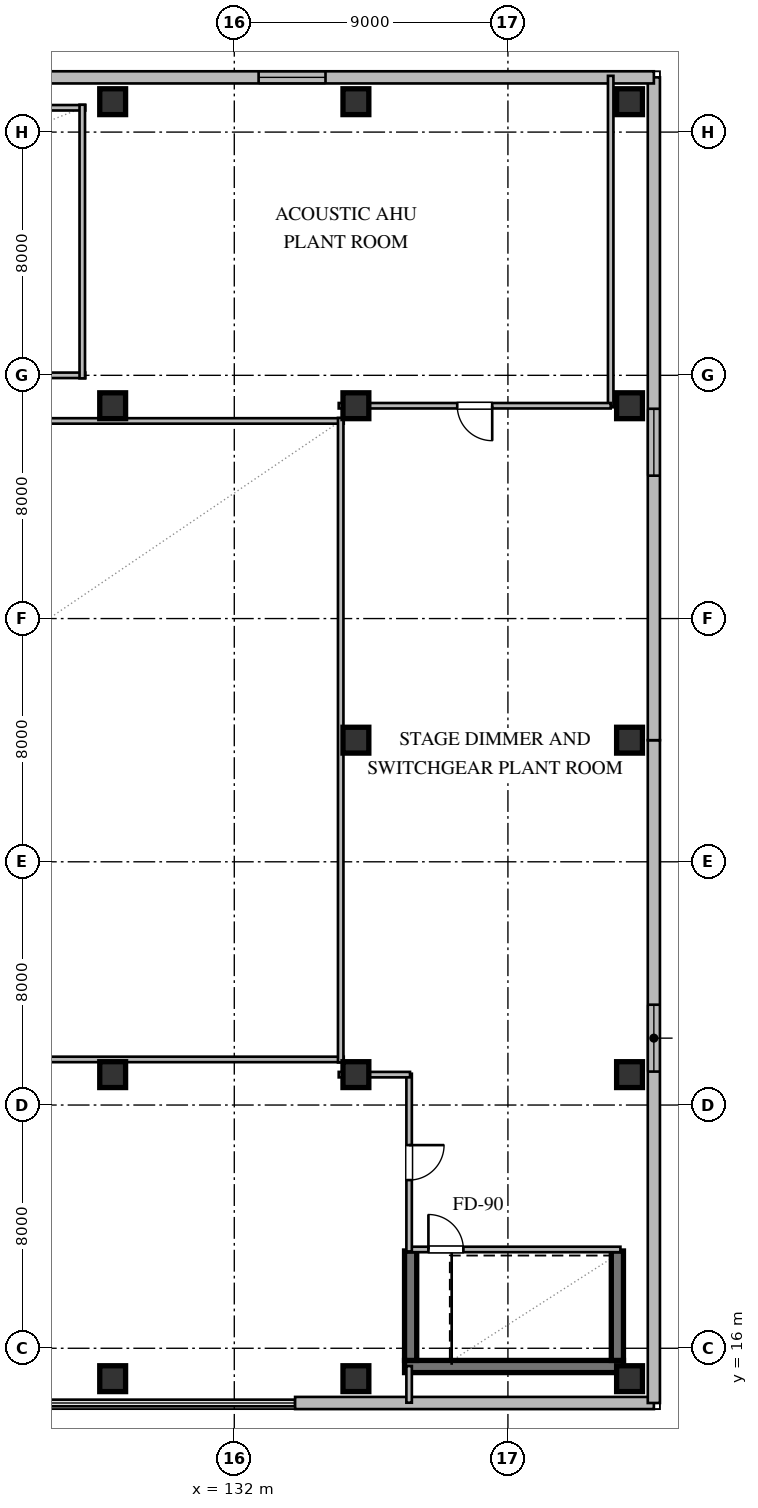
"""IFC4 building model, lengths in metres.
Left out: names, types, materials, properties, quantities, classifications, styles, units other than length and angle.
Written with IfcOpenShell. Run it as: python <this file> out.ifc"""

import sys

from ifc_helpers import new_model, si_unit, direction, frame, frame_2d, origin, origin_2d, place, context, subcontext, project, spatial, rectangle, extrude, element, fill, save


model = new_model("IFC4")
c1 = context("Model", 3, precision=1e-05, world=origin(), true_north=direction((0.0, 1.0)))
c2 = subcontext(c1, "Body", "Model", "MODEL_VIEW")
j1 = project(units=[si_unit("LENGTHUNIT", "METRE"), si_unit("PLANEANGLEUNIT", "RADIAN")], contexts=[c1])
p1 = place(None, origin())
s1 = spatial("IfcSite", under=j1, at=p1, CompositionType="ELEMENT")
p2 = place(p1, origin())
s2 = spatial("IfcBuilding", under=s1, at=p2, CompositionType="ELEMENT")
p3 = place(p2, frame((0.0, 0.0, 14.4)))
s3 = spatial("IfcBuildingStorey", under=s2, at=p3, CompositionType="ELEMENT", Elevation=14.4)
for number, where, z_axis, x_axis in (
    (1, (128.0, 15.0, 0.0), (0.0, 0.0, 1.0), (1.0, 0.0, 0.0)),
    (2, (128.0, 25.0, 0.0), (0.0, 0.0, 1.0), (1.0, 0.0, 0.0)),
    (3, (128.0, 47.0, 0.0), (0.0, 0.0, 1.0), (1.0, 0.0, 0.0)),
    (4, (128.0, 57.0, 0.0), (0.0, 0.0, 1.0), (1.0, 0.0, 0.0)),
    (5, (136.0, 15.0, 0.0), (0.0, 0.0, 1.0), (1.0, 0.0, 0.0)),
    (6, (136.0, 25.0, 0.0), (0.0, 0.0, 1.0), (1.0, 0.0, 0.0)),
    (7, (136.0, 36.0, 0.0), (0.0, 0.0, 1.0), (1.0, 0.0, 0.0)),
    (8, (136.0, 47.0, 0.0), (0.0, 0.0, 1.0), (1.0, 0.0, 0.0)),
    (9, (136.0, 57.0, 0.0), (0.0, 0.0, 1.0), (1.0, 0.0, 0.0)),
    (10, (145.0, 15.0, 0.0), (0.0, 0.0, 1.0), (1.0, 0.0, 0.0)),
    (11, (145.0, 25.0, 0.0), (0.0, 0.0, 1.0), (1.0, 0.0, 0.0)),
    (12, (145.0, 36.0, 0.0), (0.0, 0.0, 1.0), (1.0, 0.0, 0.0)),
    (13, (145.0, 47.0, 0.0), (0.0, 0.0, 1.0), (1.0, 0.0, 0.0)),
    (14, (145.0, 57.0, 0.0), (0.0, 0.0, 1.0), (1.0, 0.0, 0.0)),
):
    element("IfcColumn", number, at=place(p3, frame(where, z_axis=z_axis, x_axis=x_axis)), inside=s3, PredefinedType="COLUMN", context=c2, shape_type="SweptSolid", body=[
        extrude(rectangle(XDim=0.85, YDim=0.85, at=origin_2d()), origin(), (0.0, 0.0, 1.0), 4.8),
    ])
p4 = place(p3, frame((137.6, 15.4, 0.0), z_axis=(0.0, 0.0, 1.0), x_axis=(1.0, 0.0, 0.0)))
e15 = element("IfcWall", 15, at=p4, inside=s3, PredefinedType="SHEAR", context=c2, shape_type="SweptSolid", body=[
    extrude(rectangle(XDim=7.2, YDim=0.4, at=frame_2d((3.6, 0.0))), origin(), (0.0, 0.0, 1.0), 4.52),
])
for number, where, z_axis, x_axis in (
    (16, (137.8, 15.6, 0.0), (0.0, 0.0, 1.0), (0.0, 1.0, 0.0)),
    (17, (144.6, 15.6, 0.0), (0.0, 0.0, 1.0), (0.0, 1.0, 0.0)),
):
    element("IfcWall", number, at=place(p3, frame(where, z_axis=z_axis, x_axis=x_axis)), inside=s3, PredefinedType="SHEAR", context=c2, shape_type="SweptSolid", body=[
        extrude(rectangle(XDim=3.6, YDim=0.4, at=frame_2d((1.8, 0.0))), origin(), (0.0, 0.0, 1.0), 4.52),
    ])
p5 = place(p3, frame((134.0, 14.2, 0.0), z_axis=(0.0, 0.0, 1.0), x_axis=(1.0, 0.0, 0.0)))
e18 = element("IfcWall", 18, at=p5, inside=s3, PredefinedType="STANDARD", context=c2, shape_type="SweptSolid", body=[
    extrude(rectangle(XDim=11.8, YDim=0.4, at=frame_2d((5.9, 0.0))), origin(), (0.0, 0.0, 1.0), 4.52),
])
p6 = place(p3, frame((145.8, 14.2, 0.0), z_axis=(0.0, 0.0, 1.0), x_axis=(0.0, 1.0, 0.0)))
e19 = element("IfcWall", 19, at=p6, inside=s3, PredefinedType="STANDARD", context=c2, shape_type="SweptSolid", body=[
    extrude(rectangle(XDim=21.8, YDim=0.4, at=frame_2d((10.9, 0.0))), origin(), (0.0, 0.0, 1.0), 4.52),
])
p7 = place(p6, frame((10.9, 0.0, 1.25)))
e20 = element("IfcOpeningElement", 20, at=p7, cuts=e19, PredefinedType="OPENING", context=c2, shape_type="SweptSolid", body=[
    extrude(rectangle(XDim=2.2, YDim=1.5, at=frame_2d((1.1, 0.75))), frame((0.0, 0.21, 0.0), z_axis=(0.0, -1.0, 0.0), x_axis=(1.0, 0.0, 0.0)), (0.0, 0.0, 1.0), 0.42),
])
p8 = place(p3, frame((145.8, 36.0, 0.0), z_axis=(0.0, 0.0, 1.0), x_axis=(0.0, 1.0, 0.0)))
e21 = element("IfcWall", 21, at=p8, inside=s3, PredefinedType="STANDARD", context=c2, shape_type="SweptSolid", body=[
    extrude(rectangle(XDim=21.8, YDim=0.4, at=frame_2d((10.9, 0.0))), origin(), (0.0, 0.0, 1.0), 4.52),
])
p9 = place(p8, frame((8.7, 0.0, 1.25)))
e22 = element("IfcOpeningElement", 22, at=p9, cuts=e21, PredefinedType="OPENING", context=c2, shape_type="SweptSolid", body=[
    extrude(rectangle(XDim=2.2, YDim=1.5, at=frame_2d((1.1, 0.75))), frame((0.0, 0.21, 0.0), z_axis=(0.0, -1.0, 0.0), x_axis=(1.0, 0.0, 0.0)), (0.0, 0.0, 1.0), 0.42),
])
p10 = place(p3, frame((145.8, 57.8, 0.0), z_axis=(0.0, 0.0, 1.0), x_axis=(-1.0, 0.0, 0.0)))
e23 = element("IfcWall", 23, at=p10, inside=s3, PredefinedType="STANDARD", context=c2, shape_type="SweptSolid", body=[
    extrude(rectangle(XDim=23.8, YDim=0.4, at=frame_2d((11.9, 0.0))), origin(), (0.0, 0.0, 1.0), 4.52),
])
p11 = place(p10, frame((10.8, 0.0, 1.25)))
e24 = element("IfcOpeningElement", 24, at=p11, cuts=e23, PredefinedType="OPENING", context=c2, shape_type="SweptSolid", body=[
    extrude(rectangle(XDim=2.2, YDim=1.5, at=frame_2d((1.1, 0.75))), frame((0.0, 0.21, 0.0), z_axis=(0.0, -1.0, 0.0), x_axis=(1.0, 0.0, 0.0)), (0.0, 0.0, 1.0), 0.42),
])
p12 = place(p3, frame((137.7, 19.25, 0.0), z_axis=(0.0, 0.0, 1.0), x_axis=(1.0, 0.0, 0.0)))
e25 = element("IfcWall", 25, at=p12, inside=s3, PredefinedType="PARTITIONING", context=c2, shape_type="SweptSolid", body=[
    extrude(rectangle(XDim=7.0, YDim=0.18, at=frame_2d((3.5, 0.0))), origin(), (0.0, 0.0, 1.0), 4.52),
])
p13 = place(p12, frame((0.685, 0.0, 0.0)))
e26 = element("IfcOpeningElement", 26, at=p13, cuts=e25, PredefinedType="OPENING", context=c2, shape_type="SweptSolid", body=[
    extrude(rectangle(XDim=1.15, YDim=2.1, at=frame_2d((0.575, 1.05))), frame((0.0, 0.1, 0.0), z_axis=(0.0, -1.0, 0.0), x_axis=(1.0, 0.0, 0.0)), (0.0, 0.0, 1.0), 0.2),
])
for number, where, z_axis, x_axis in (
    (27, (104.4, 25.5, 0.0), (0.0, 0.0, 1.0), (1.0, 0.0, 0.0)),
    (28, (104.4, 46.5, 0.0), (0.0, 0.0, 1.0), (1.0, 0.0, 0.0)),
):
    element("IfcWall", number, at=place(p3, frame(where, z_axis=z_axis, x_axis=x_axis)), inside=s3, PredefinedType="PARTITIONING", context=c2, shape_type="SweptSolid", body=[
        extrude(rectangle(XDim=31.2, YDim=0.18, at=frame_2d((15.6, 0.0))), origin(), (0.0, 0.0, 1.0), 3.899),
    ])
p14 = place(p3, frame((135.5, 25.4, 0.0), z_axis=(0.0, 0.0, 1.0), x_axis=(0.0, 1.0, 0.0)))
e29 = element("IfcWall", 29, at=p14, inside=s3, PredefinedType="PARTITIONING", context=c2, shape_type="SweptSolid", body=[
    extrude(rectangle(XDim=21.2, YDim=0.18, at=frame_2d((10.6, 0.0))), origin(), (0.0, 0.0, 1.0), 4.093),
])
p15 = place(p3, frame((104.9, 48.0, 0.0), z_axis=(0.0, 0.0, 1.0), x_axis=(1.0, 0.0, 0.0)))
e30 = element("IfcWall", 30, at=p15, inside=s3, PredefinedType="PARTITIONING", context=c2, shape_type="SweptSolid", body=[
    extrude(rectangle(XDim=22.2, YDim=0.18, at=frame_2d((11.1, 0.0))), origin(), (0.0, 0.0, 1.0), 4.52),
])
p16 = place(p3, frame((104.9, 56.8, 0.0), z_axis=(0.0, 0.0, 1.0), x_axis=(1.0, 0.0, 0.0)))
e31 = element("IfcWall", 31, at=p16, inside=s3, PredefinedType="PARTITIONING", context=c2, shape_type="SweptSolid", body=[
    extrude(rectangle(XDim=22.2, YDim=0.18, at=frame_2d((11.1, 0.0))), origin(), (0.0, 0.0, 1.0), 3.899),
])
p17 = place(p3, frame((127.0, 47.9, 0.0), z_axis=(0.0, 0.0, 1.0), x_axis=(0.0, 1.0, 0.0)))
e32 = element("IfcWall", 32, at=p17, inside=s3, PredefinedType="PARTITIONING", context=c2, shape_type="SweptSolid", body=[
    extrude(rectangle(XDim=9.0, YDim=0.18, at=frame_2d((4.5, 0.0))), origin(), (0.0, 0.0, 1.0), 4.52),
])
p18 = place(p3, frame((144.38, 46.95, 0.0), z_axis=(0.0, 0.0, 1.0), x_axis=(0.0, 1.0, 0.0)))
e33 = element("IfcWall", 33, at=p18, inside=s3, PredefinedType="PARTITIONING", context=c2, shape_type="SweptSolid", body=[
    extrude(rectangle(XDim=10.9, YDim=0.18, at=frame_2d((5.45, 0.0))), origin(), (0.0, 0.0, 1.0), 4.093),
])
p19 = place(p3, frame((137.75, 25.03, 0.0), z_axis=(0.0, 0.0, 1.0), x_axis=(0.0, -1.0, 0.0)))
e34 = element("IfcWall", 34, at=p19, inside=s3, PredefinedType="PARTITIONING", context=c2, shape_type="SweptSolid", body=[
    extrude(rectangle(XDim=5.845, YDim=0.18, at=frame_2d((2.922, 0.0))), origin(), (0.0, 0.0, 1.0), 4.52),
])
p20 = place(p19, frame((2.348, 0.0, 0.0)))
e35 = element("IfcOpeningElement", 35, at=p20, cuts=e34, PredefinedType="OPENING", context=c2, shape_type="SweptSolid", body=[
    extrude(rectangle(XDim=1.15, YDim=2.1, at=frame_2d((0.575, 1.05))), frame((0.0, 0.1, 0.0), z_axis=(0.0, -1.0, 0.0), x_axis=(1.0, 0.0, 0.0)), (0.0, 0.0, 1.0), 0.2),
])
p21 = place(p3, frame((135.435, 25.0, 0.0), z_axis=(0.0, 0.0, 1.0), x_axis=(1.0, 0.0, 0.0)))
e36 = element("IfcWall", 36, at=p21, inside=s3, PredefinedType="PARTITIONING", context=c2, shape_type="SweptSolid", body=[
    extrude(rectangle(XDim=2.345, YDim=0.18, at=frame_2d((1.172, 0.0))), origin(), (0.0, 0.0, 1.0), 3.899),
])
p22 = place(p3, frame((137.75, 15.415, 0.0), z_axis=(0.0, 0.0, 1.0), x_axis=(0.0, -1.0, 0.0)))
e37 = element("IfcWall", 37, at=p22, inside=s3, PredefinedType="PARTITIONING", context=c2, shape_type="SweptSolid", body=[
    extrude(rectangle(XDim=1.205, YDim=0.18, at=frame_2d((0.603, 0.0))), origin(), (0.0, 0.0, 1.0), 4.52),
])
p23 = place(p3, frame((144.38, 47.0, 0.0), z_axis=(0.0, 0.0, 1.0), x_axis=(-1.0, 0.0, 0.0)))
e38 = element("IfcWall", 38, at=p23, inside=s3, PredefinedType="PARTITIONING", context=c2, shape_type="SweptSolid", body=[
    extrude(rectangle(XDim=8.945, YDim=0.18, at=frame_2d((4.472, 0.0))), origin(), (0.0, 0.0, 1.0), 3.899),
])
p24 = place(p23, frame((3.897, 0.0, 0.0)))
e39 = element("IfcOpeningElement", 39, at=p24, cuts=e38, PredefinedType="OPENING", context=c2, shape_type="SweptSolid", body=[
    extrude(rectangle(XDim=1.15, YDim=2.1, at=frame_2d((0.575, 1.05))), frame((0.0, 0.1, 0.0), z_axis=(0.0, -1.0, 0.0), x_axis=(1.0, 0.0, 0.0)), (0.0, 0.0, 1.0), 0.2),
])
p25 = place(p7, origin())
e40 = element("IfcWindow", 40, at=p25, inside=s3, PartitioningType="SINGLE_PANEL", PredefinedType="WINDOW", context=c2, shape_type="SweptSolid", body=[
    extrude(rectangle(XDim=2.2, YDim=1.5, at=frame_2d((1.1, 0.75))), frame((0.0, 0.03, 0.0), z_axis=(0.0, -1.0, 0.0), x_axis=(1.0, 0.0, 0.0)), (0.0, 0.0, 1.0), 0.06),
])
fill(e20, e40)
p26 = place(p9, origin())
e41 = element("IfcWindow", 41, at=p26, inside=s3, PartitioningType="SINGLE_PANEL", PredefinedType="WINDOW", context=c2, shape_type="SweptSolid", body=[
    extrude(rectangle(XDim=2.2, YDim=1.5, at=frame_2d((1.1, 0.75))), frame((0.0, 0.03, 0.0), z_axis=(0.0, -1.0, 0.0), x_axis=(1.0, 0.0, 0.0)), (0.0, 0.0, 1.0), 0.06),
])
fill(e22, e41)
p27 = place(p11, origin())
e42 = element("IfcWindow", 42, at=p27, inside=s3, PartitioningType="SINGLE_PANEL", PredefinedType="WINDOW", context=c2, shape_type="SweptSolid", body=[
    extrude(rectangle(XDim=2.2, YDim=1.5, at=frame_2d((1.1, 0.75))), frame((0.0, 0.03, 0.0), z_axis=(0.0, -1.0, 0.0), x_axis=(1.0, 0.0, 0.0)), (0.0, 0.0, 1.0), 0.06),
])
fill(e24, e42)
p28 = place(p13, origin())
e43 = element("IfcDoor", 43, at=p28, inside=s3, OperationType="SINGLE_SWING_LEFT", PredefinedType="DOOR", context=c2, shape_type="SweptSolid", body=[
    extrude(rectangle(XDim=1.15, YDim=2.1, at=frame_2d((0.575, 1.05))), frame((0.0, 0.025, 0.0), z_axis=(0.0, -1.0, 0.0), x_axis=(1.0, 0.0, 0.0)), (0.0, 0.0, 1.0), 0.05),
])
fill(e26, e43)
p29 = place(p20, origin())
e44 = element("IfcDoor", 44, at=p29, inside=s3, OperationType="SINGLE_SWING_LEFT", PredefinedType="DOOR", context=c2, shape_type="SweptSolid", body=[
    extrude(rectangle(XDim=1.15, YDim=2.1, at=frame_2d((0.575, 1.05))), frame((0.0, 0.025, 0.0), z_axis=(0.0, -1.0, 0.0), x_axis=(1.0, 0.0, 0.0)), (0.0, 0.0, 1.0), 0.05),
])
fill(e35, e44)
p30 = place(p24, origin())
e45 = element("IfcDoor", 45, at=p30, inside=s3, OperationType="SINGLE_SWING_LEFT", PredefinedType="DOOR", context=c2, shape_type="SweptSolid", body=[
    extrude(rectangle(XDim=1.15, YDim=2.1, at=frame_2d((0.575, 1.05))), frame((0.0, 0.025, 0.0), z_axis=(0.0, -1.0, 0.0), x_axis=(1.0, 0.0, 0.0)), (0.0, 0.0, 1.0), 0.05),
])
fill(e39, e45)
save(model, sys.argv[1])
